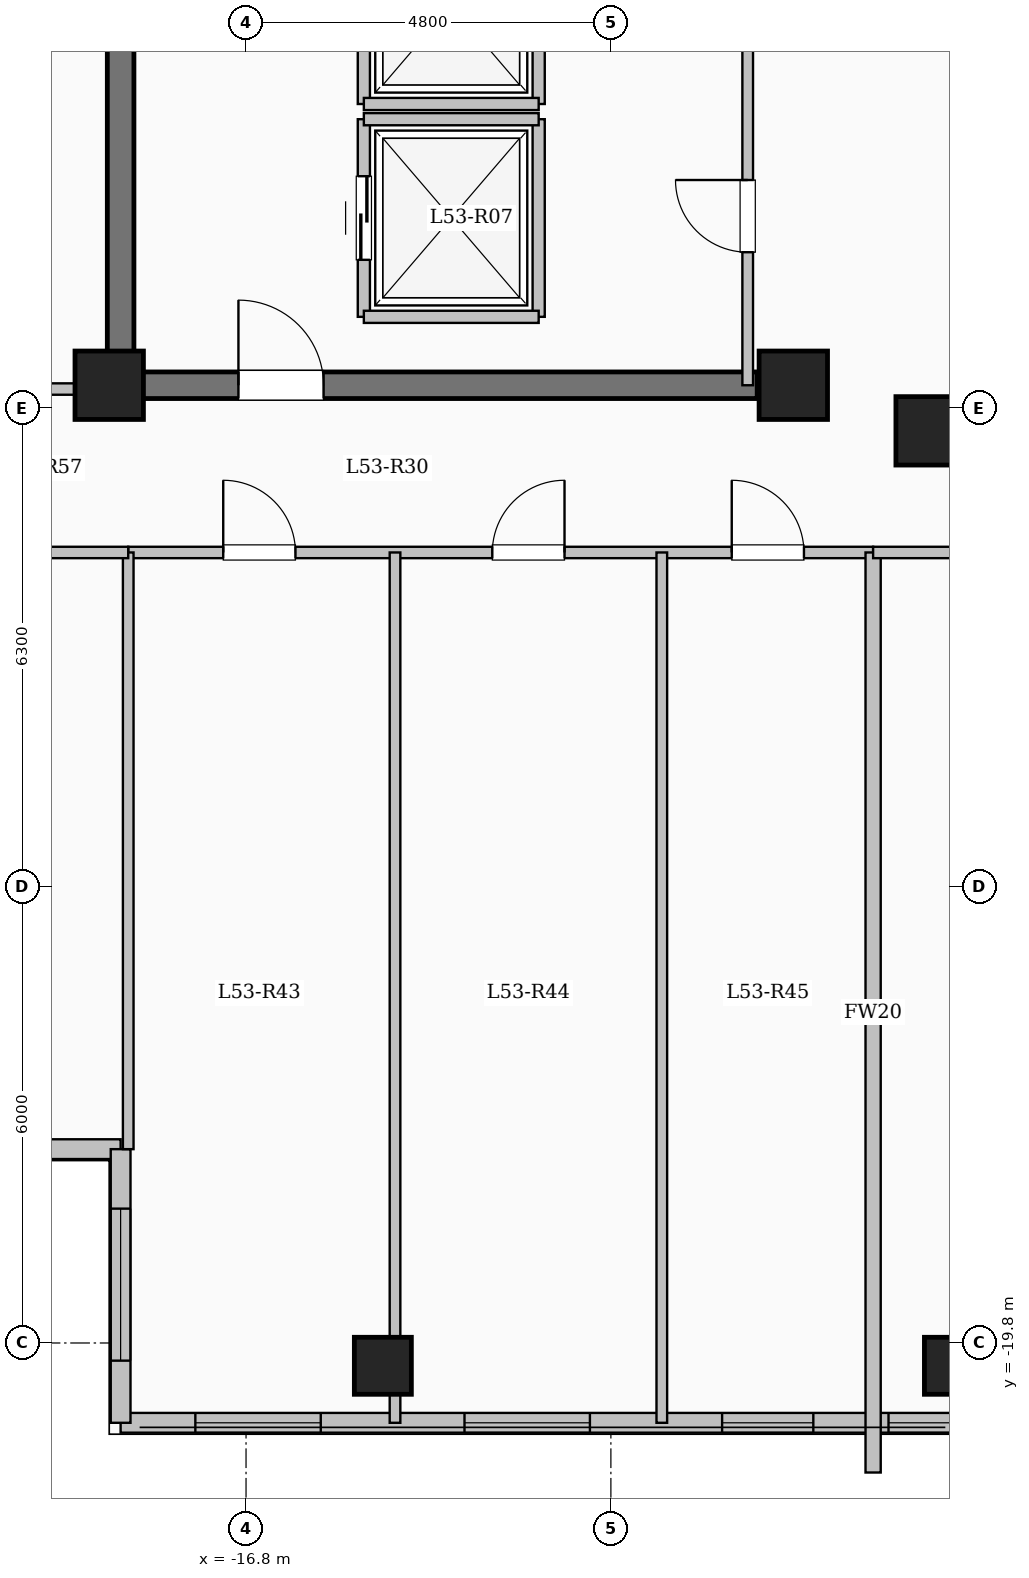
"""IFC4 building model, lengths in metres.
Left out: names, types, materials, properties, quantities, classifications, styles, units other than length and angle.
Written with IfcOpenShell. Run it as: python <this file> out.ifc"""

import sys

from ifc_helpers import new_model, si_unit, direction, frame, frame_2d, origin, origin_2d, place, context, subcontext, project, spatial, rectangle, extrude, element, fill, save


model = new_model("IFC4")
c1 = context("Model", 3, precision=1e-05, world=origin(), true_north=direction((0.0, 1.0)))
c2 = subcontext(c1, "Body", "Model", "MODEL_VIEW")
j1 = project(units=[si_unit("LENGTHUNIT", "METRE"), si_unit("PLANEANGLEUNIT", "RADIAN")], contexts=[c1])
p1 = place(None, origin())
s1 = spatial("IfcSite", under=j1, at=p1, CompositionType="ELEMENT")
p2 = place(p1, origin())
s2 = spatial("IfcBuilding", under=s1, at=p2, CompositionType="ELEMENT")
p3 = place(p2, frame((0.0, 0.0, 196.95)))
s3 = spatial("IfcBuildingStorey", under=s2, at=p3, CompositionType="ELEMENT", Elevation=196.95)
for number, where, z_axis, x_axis in (
    (1, (-7.8, -7.8, 0.0), (0.0, 0.0, 1.0), (1.0, 0.0, 0.0)),
    (2, (-9.6, -7.2, 0.0), (0.0, 0.0, 1.0), (1.0, 0.0, 0.0)),
    (3, (-18.6, -7.2, 0.0), (0.0, 0.0, 1.0), (1.0, 0.0, 0.0)),
):
    element("IfcColumn", number, at=place(p3, frame(where, z_axis=z_axis, x_axis=x_axis)), inside=s3, PredefinedType="COLUMN", context=c2, shape_type="SweptSolid", body=[
        extrude(rectangle(XDim=0.9, YDim=0.9, at=origin_2d()), origin(), (0.0, 0.0, 1.0), 3.35),
    ])
for number, where, z_axis, x_axis in (
    (4, (-15.0, -20.1, 0.0), (0.0, 0.0, 1.0), (1.0, 0.0, 0.0)),
    (5, (-7.5, -20.1, 0.0), (0.0, 0.0, 1.0), (1.0, 0.0, 0.0)),
):
    element("IfcColumn", number, at=place(p3, frame(where, z_axis=z_axis, x_axis=x_axis)), inside=s3, PredefinedType="COLUMN", context=c2, shape_type="SweptSolid", body=[
        extrude(rectangle(XDim=0.75, YDim=0.75, at=origin_2d()), origin(), (0.0, 0.0, 1.0), 3.35),
    ])
p4 = place(p3, frame((-18.45, -17.25, 0.0), z_axis=(0.0, 0.0, 1.0), x_axis=(-1.0, 0.0, 0.0)))
e6 = element("IfcWall", 6, at=p4, inside=s3, PredefinedType="SOLIDWALL", context=c2, shape_type="SweptSolid", body=[
    extrude(rectangle(XDim=5.1, YDim=0.26, at=frame_2d((2.55, 0.0))), origin(), (0.0, 0.0, 1.0), 3.1),
])
p5 = place(p4, frame((1.425, 0.0, 0.9)))
e7 = element("IfcOpeningElement", 7, at=p5, cuts=e6, PredefinedType="OPENING", context=c2, shape_type="SweptSolid", body=[
    extrude(rectangle(XDim=2.2, YDim=1.75, at=frame_2d((1.1, 0.875))), frame((0.0, 0.14, 0.0), z_axis=(0.0, -1.0, 0.0), x_axis=(1.0, 0.0, 0.0)), (0.0, 0.0, 1.0), 0.28),
])
p6 = place(p3, frame((-7.35, -20.85, 0.0), z_axis=(0.0, 0.0, 1.0), x_axis=(-1.0, 0.0, 0.0)))
e8 = element("IfcWall", 8, at=p6, inside=s3, PredefinedType="SOLIDWALL", context=c2, shape_type="SweptSolid", body=[
    extrude(rectangle(XDim=11.1, YDim=0.26, at=frame_2d((5.55, 0.0))), origin(), (0.0, 0.0, 1.0), 3.1),
])
p7 = place(p6, frame((0.147, 0.0, 0.95)))
e9 = element("IfcOpeningElement", 9, at=p7, cuts=e8, PredefinedType="OPENING", context=c2, shape_type="SweptSolid", body=[
    extrude(rectangle(XDim=0.85, YDim=1.5, at=frame_2d((0.425, 0.75))), frame((0.0, 0.14, 0.0), z_axis=(0.0, -1.0, 0.0), x_axis=(1.0, 0.0, 0.0)), (0.0, 0.0, 1.0), 0.28),
])
p8 = place(p6, frame((1.987, 0.0, 0.95)))
e10 = element("IfcOpeningElement", 10, at=p8, cuts=e8, PredefinedType="OPENING", context=c2, shape_type="SweptSolid", body=[
    extrude(rectangle(XDim=1.2, YDim=1.5, at=frame_2d((0.6, 0.75))), frame((0.0, 0.14, 0.0), z_axis=(0.0, -1.0, 0.0), x_axis=(1.0, 0.0, 0.0)), (0.0, 0.0, 1.0), 0.28),
])
p9 = place(p6, frame((4.926, 0.0, 0.9)))
e11 = element("IfcOpeningElement", 11, at=p9, cuts=e8, PredefinedType="OPENING", context=c2, shape_type="SweptSolid", body=[
    extrude(rectangle(XDim=1.65, YDim=1.6, at=frame_2d((0.825, 0.8))), frame((0.0, 0.14, 0.0), z_axis=(0.0, -1.0, 0.0), x_axis=(1.0, 0.0, 0.0)), (0.0, 0.0, 1.0), 0.28),
])
p10 = place(p6, frame((8.467, 0.0, 0.9)))
e12 = element("IfcOpeningElement", 12, at=p10, cuts=e8, PredefinedType="OPENING", context=c2, shape_type="SweptSolid", body=[
    extrude(rectangle(XDim=1.65, YDim=1.6, at=frame_2d((0.825, 0.8))), frame((0.0, 0.14, 0.0), z_axis=(0.0, -1.0, 0.0), x_axis=(1.0, 0.0, 0.0)), (0.0, 0.0, 1.0), 0.28),
])
p11 = place(p3, frame((-18.45, -20.85, 0.0), z_axis=(0.0, 0.0, 1.0), x_axis=(0.0, 1.0, 0.0)))
e13 = element("IfcWall", 13, at=p11, inside=s3, PredefinedType="SOLIDWALL", context=c2, shape_type="SweptSolid", body=[
    extrude(rectangle(XDim=3.6, YDim=0.26, at=frame_2d((1.8, 0.0))), origin(), (0.0, 0.0, 1.0), 3.1),
])
p12 = place(p11, frame((0.817, 0.0, 0.9)))
e14 = element("IfcOpeningElement", 14, at=p12, cuts=e13, PredefinedType="OPENING", context=c2, shape_type="SweptSolid", body=[
    extrude(rectangle(XDim=2.0, YDim=1.7, at=frame_2d((1.0, 0.85))), frame((0.0, 0.14, 0.0), z_axis=(0.0, -1.0, 0.0), x_axis=(1.0, 0.0, 0.0)), (0.0, 0.0, 1.0), 0.28),
])
p13 = place(p3, frame((-15.25, -6.3, 0.0), z_axis=(0.0, 0.0, 1.0), x_axis=(0.0, 1.0, 0.0)))
e15 = element("IfcWall", 15, at=p13, inside=s3, PredefinedType="SOLIDWALL", context=c2, shape_type="SweptSolid", body=[
    extrude(rectangle(XDim=2.6, YDim=0.16, at=frame_2d((1.3, 0.0))), origin(), (0.0, 0.0, 1.0), 3.1),
])
p14 = place(p13, frame((0.75, 0.0, 0.0)))
e16 = element("IfcOpeningElement", 16, at=p14, cuts=e15, PredefinedType="OPENING", context=c2, shape_type="SweptSolid", body=[
    extrude(rectangle(XDim=1.1, YDim=2.15, at=frame_2d((0.55, 1.075))), frame((0.0, 0.09, 0.0), z_axis=(0.0, -1.0, 0.0), x_axis=(1.0, 0.0, 0.0)), (0.0, 0.0, 1.0), 0.18),
])
p15 = place(p3, frame((-12.95, -6.3, 0.0), z_axis=(0.0, 0.0, 1.0), x_axis=(0.0, 1.0, 0.0)))
e17 = element("IfcWall", 17, at=p15, inside=s3, PredefinedType="SOLIDWALL", context=c2, shape_type="SweptSolid", body=[
    extrude(rectangle(XDim=2.6, YDim=0.16, at=frame_2d((1.3, 0.0))), origin(), (0.0, 0.0, 1.0), 3.1),
])
for number, where, z_axis, x_axis in (
    (18, (-15.25, -6.3, 0.0), (0.0, 0.0, 1.0), (1.0, 0.0, 0.0)),
    (19, (-15.25, -3.7, 0.0), (0.0, 0.0, 1.0), (1.0, 0.0, 0.0)),
):
    element("IfcWall", number, at=place(p3, frame(where, z_axis=z_axis, x_axis=x_axis)), inside=s3, PredefinedType="SOLIDWALL", context=c2, shape_type="SweptSolid", body=[
        extrude(rectangle(XDim=2.3, YDim=0.16, at=frame_2d((1.15, 0.0))), origin(), (0.0, 0.0, 1.0), 3.1),
    ])
p16 = place(p3, frame((-15.25, -3.5, 0.0), z_axis=(0.0, 0.0, 1.0), x_axis=(0.0, 1.0, 0.0)))
e20 = element("IfcWall", 20, at=p16, inside=s3, PredefinedType="SOLIDWALL", context=c2, shape_type="SweptSolid", body=[
    extrude(rectangle(XDim=2.6, YDim=0.16, at=frame_2d((1.3, 0.0))), origin(), (0.0, 0.0, 1.0), 3.1),
])
p17 = place(p16, frame((0.75, 0.0, 0.0)))
e21 = element("IfcOpeningElement", 21, at=p17, cuts=e20, PredefinedType="OPENING", context=c2, shape_type="SweptSolid", body=[
    extrude(rectangle(XDim=1.1, YDim=2.15, at=frame_2d((0.55, 1.075))), frame((0.0, 0.09, 0.0), z_axis=(0.0, -1.0, 0.0), x_axis=(1.0, 0.0, 0.0)), (0.0, 0.0, 1.0), 0.18),
])
p18 = place(p3, frame((-12.95, -3.5, 0.0), z_axis=(0.0, 0.0, 1.0), x_axis=(0.0, 1.0, 0.0)))
e22 = element("IfcWall", 22, at=p18, inside=s3, PredefinedType="SOLIDWALL", context=c2, shape_type="SweptSolid", body=[
    extrude(rectangle(XDim=2.6, YDim=0.16, at=frame_2d((1.3, 0.0))), origin(), (0.0, 0.0, 1.0), 3.1),
])
p19 = place(p3, frame((-15.25, -3.5, 0.0), z_axis=(0.0, 0.0, 1.0), x_axis=(1.0, 0.0, 0.0)))
e23 = element("IfcWall", 23, at=p19, inside=s3, PredefinedType="SOLIDWALL", context=c2, shape_type="SweptSolid", body=[
    extrude(rectangle(XDim=2.3, YDim=0.16, at=frame_2d((1.15, 0.0))), origin(), (0.0, 0.0, 1.0), 3.1),
])
p20 = place(p3, frame((-18.45, -7.375, 0.0), z_axis=(0.0, 0.0, 1.0), x_axis=(0.0, 1.0, 0.0)))
e24 = element("IfcWall", 24, at=p20, inside=s3, PredefinedType="SHEAR", context=c2, shape_type="SweptSolid", body=[
    extrude(rectangle(XDim=14.05, YDim=0.35, at=frame_2d((7.025, 0.0))), origin(), (0.0, 0.0, 1.0), 3.35),
])
p21 = place(p3, frame((-18.625, -7.2, 0.0), z_axis=(0.0, 0.0, 1.0), x_axis=(1.0, 0.0, 0.0)))
e25 = element("IfcWall", 25, at=p21, inside=s3, PredefinedType="SHEAR", context=c2, shape_type="SweptSolid", body=[
    extrude(rectangle(XDim=8.55, YDim=0.35, at=frame_2d((4.275, 0.0))), origin(), (0.0, 0.0, 1.0), 3.35),
])
p22 = place(p21, frame((1.725, 0.0, 0.0)))
e26 = element("IfcOpeningElement", 26, at=p22, cuts=e25, PredefinedType="OPENING", context=c2, shape_type="SweptSolid", body=[
    extrude(rectangle(XDim=1.12, YDim=2.15, at=frame_2d((0.56, 1.075))), frame((0.0, 0.185, 0.0), z_axis=(0.0, -1.0, 0.0), x_axis=(1.0, 0.0, 0.0)), (0.0, 0.0, 1.0), 0.37),
])
p23 = place(p3, frame((-10.2, -7.2, 0.0), z_axis=(0.0, 0.0, 1.0), x_axis=(0.0, 1.0, 0.0)))
e27 = element("IfcWall", 27, at=p23, inside=s3, PredefinedType="PARTITIONING", context=c2, shape_type="SweptSolid", body=[
    extrude(rectangle(XDim=9.12, YDim=0.14, at=frame_2d((4.56, 0.0))), origin(), (0.0, 0.0, 1.0), 3.1),
])
p24 = place(p23, frame((1.75, 0.0, 0.0)))
e28 = element("IfcOpeningElement", 28, at=p24, cuts=e27, PredefinedType="OPENING", context=c2, shape_type="SweptSolid", body=[
    extrude(rectangle(XDim=0.95, YDim=2.12, at=frame_2d((0.475, 1.06))), frame((0.0, 0.08, 0.0), z_axis=(0.0, -1.0, 0.0), x_axis=(1.0, 0.0, 0.0)), (0.0, 0.0, 1.0), 0.16),
])
p25 = place(p23, frame((7.9, 0.0, 0.0)))
e29 = element("IfcOpeningElement", 29, at=p25, cuts=e27, PredefinedType="OPENING", context=c2, shape_type="SweptSolid", body=[
    extrude(rectangle(XDim=0.95, YDim=2.12, at=frame_2d((0.475, 1.06))), frame((0.0, 0.08, 0.0), z_axis=(0.0, -1.0, 0.0), x_axis=(1.0, 0.0, 0.0)), (0.0, 0.0, 1.0), 0.16),
])
p26 = place(p3, frame((-18.35, -9.4, 0.0), z_axis=(0.0, 0.0, 1.0), x_axis=(1.0, 0.0, 0.0)))
e30 = element("IfcWall", 30, at=p26, inside=s3, PredefinedType="PARTITIONING", context=c2, shape_type="SweptSolid", body=[
    extrude(rectangle(XDim=9.8, YDim=0.15, at=frame_2d((4.9, 0.0))), origin(), (0.0, 0.0, 1.0), 3.1),
])
p27 = place(p26, frame((1.25, 0.0, 0.0)))
e31 = element("IfcOpeningElement", 31, at=p27, cuts=e30, PredefinedType="OPENING", context=c2, shape_type="SweptSolid", body=[
    extrude(rectangle(XDim=0.95, YDim=2.15, at=frame_2d((0.475, 1.075))), frame((0.0, 0.085, 0.0), z_axis=(0.0, -1.0, 0.0), x_axis=(1.0, 0.0, 0.0)), (0.0, 0.0, 1.0), 0.17),
])
p28 = place(p26, frame((4.79, 0.0, 0.0)))
e32 = element("IfcOpeningElement", 32, at=p28, cuts=e30, PredefinedType="OPENING", context=c2, shape_type="SweptSolid", body=[
    extrude(rectangle(XDim=0.95, YDim=2.15, at=frame_2d((0.475, 1.075))), frame((0.0, 0.085, 0.0), z_axis=(0.0, -1.0, 0.0), x_axis=(1.0, 0.0, 0.0)), (0.0, 0.0, 1.0), 0.17),
])
p29 = place(p26, frame((7.94, 0.0, 0.0)))
e33 = element("IfcOpeningElement", 33, at=p29, cuts=e30, PredefinedType="OPENING", context=c2, shape_type="SweptSolid", body=[
    extrude(rectangle(XDim=0.95, YDim=2.15, at=frame_2d((0.475, 1.075))), frame((0.0, 0.085, 0.0), z_axis=(0.0, -1.0, 0.0), x_axis=(1.0, 0.0, 0.0)), (0.0, 0.0, 1.0), 0.17),
])
p30 = place(p3, frame((-14.84, -20.85, 0.0), z_axis=(0.0, 0.0, 1.0), x_axis=(0.0, 1.0, 0.0)))
e34 = element("IfcWall", 34, at=p30, inside=s3, PredefinedType="PARTITIONING", context=c2, shape_type="SweptSolid", body=[
    extrude(rectangle(XDim=11.45, YDim=0.14, at=frame_2d((5.725, 0.0))), origin(), (0.0, 0.0, 1.0), 2.585),
])
p31 = place(p3, frame((-11.33, -20.85, 0.0), z_axis=(0.0, 0.0, 1.0), x_axis=(0.0, 1.0, 0.0)))
e35 = element("IfcWall", 35, at=p31, inside=s3, PredefinedType="PARTITIONING", context=c2, shape_type="SweptSolid", body=[
    extrude(rectangle(XDim=11.45, YDim=0.14, at=frame_2d((5.725, 0.0))), origin(), (0.0, 0.0, 1.0), 3.1),
])
p32 = place(p3, frame((-8.55, -21.504, 0.0), z_axis=(0.0, 0.0, 1.0), x_axis=(0.0, 1.0, 0.0)))
e36 = element("IfcWall", 36, at=p32, inside=s3, PredefinedType="SOLIDWALL", context=c2, shape_type="SweptSolid", body=[
    extrude(rectangle(XDim=12.104, YDim=0.2, at=frame_2d((6.052, 0.0))), origin(), (0.0, 0.0, 1.0), 3.1),
])
p33 = place(p3, frame((-8.55, -9.4, 0.0), z_axis=(0.0, 0.0, 1.0), x_axis=(1.0, 0.0, 0.0)))
e37 = element("IfcWall", 37, at=p33, inside=s3, PredefinedType="PARTITIONING", context=c2, shape_type="SweptSolid", body=[
    extrude(rectangle(XDim=17.1, YDim=0.15, at=frame_2d((8.55, 0.0))), origin(), (0.0, 0.0, 1.0), 3.1),
])
p34 = place(p33, frame((1.9, 0.0, 0.0)))
e38 = element("IfcOpeningElement", 38, at=p34, cuts=e37, PredefinedType="OPENING", context=c2, shape_type="SweptSolid", body=[
    extrude(rectangle(XDim=0.95, YDim=2.15, at=frame_2d((0.475, 1.075))), frame((0.0, 0.085, 0.0), z_axis=(0.0, -1.0, 0.0), x_axis=(1.0, 0.0, 0.0)), (0.0, 0.0, 1.0), 0.17),
])
p35 = place(p33, frame((10.5, 0.0, 0.0)))
e39 = element("IfcOpeningElement", 39, at=p35, cuts=e37, PredefinedType="OPENING", context=c2, shape_type="SweptSolid", body=[
    extrude(rectangle(XDim=0.95, YDim=2.15, at=frame_2d((0.475, 1.075))), frame((0.0, 0.085, 0.0), z_axis=(0.0, -1.0, 0.0), x_axis=(1.0, 0.0, 0.0)), (0.0, 0.0, 1.0), 0.17),
])
p36 = place(p3, frame((-23.58, -7.25, 0.0), z_axis=(0.0, 0.0, 1.0), x_axis=(1.0, 0.0, 0.0)))
e40 = element("IfcWall", 40, at=p36, inside=s3, PredefinedType="PARTITIONING", context=c2, shape_type="SweptSolid", body=[
    extrude(rectangle(XDim=5.13, YDim=0.15, at=frame_2d((2.565, 0.0))), origin(), (0.0, 0.0, 1.0), 3.1),
])
p37 = place(p36, frame((2.08, 0.0, 0.0)))
e41 = element("IfcOpeningElement", 41, at=p37, cuts=e40, PredefinedType="OPENING", context=c2, shape_type="SweptSolid", body=[
    extrude(rectangle(XDim=1.08, YDim=2.15, at=frame_2d((0.54, 1.075))), frame((0.0, 0.085, 0.0), z_axis=(0.0, -1.0, 0.0), x_axis=(1.0, 0.0, 0.0)), (0.0, 0.0, 1.0), 0.17),
])
p38 = place(p3, frame((-18.35, -17.25, 0.0), z_axis=(0.0, 0.0, 1.0), x_axis=(0.0, 1.0, 0.0)))
e42 = element("IfcWall", 42, at=p38, inside=s3, PredefinedType="PARTITIONING", context=c2, shape_type="SweptSolid", body=[
    extrude(rectangle(XDim=7.85, YDim=0.14, at=frame_2d((3.925, 0.0))), origin(), (0.0, 0.0, 1.0), 3.1),
])
p39 = place(p3, frame((-23.58, -9.4, 0.0), z_axis=(0.0, 0.0, 1.0), x_axis=(1.0, 0.0, 0.0)))
e43 = element("IfcWall", 43, at=p39, inside=s3, PredefinedType="PARTITIONING", context=c2, shape_type="SweptSolid", body=[
    extrude(rectangle(XDim=5.23, YDim=0.15, at=frame_2d((2.615, 0.0))), origin(), (0.0, 0.0, 1.0), 3.1),
])
p40 = place(p39, frame((2.14, 0.0, 0.0)))
e44 = element("IfcOpeningElement", 44, at=p40, cuts=e43, PredefinedType="OPENING", context=c2, shape_type="SweptSolid", body=[
    extrude(rectangle(XDim=0.95, YDim=2.15, at=frame_2d((0.475, 1.075))), frame((0.0, 0.085, 0.0), z_axis=(0.0, -1.0, 0.0), x_axis=(1.0, 0.0, 0.0)), (0.0, 0.0, 1.0), 0.17),
])
p41 = place(p7, origin())
e45 = element("IfcWindow", 45, at=p41, inside=s3, PartitioningType="SINGLE_PANEL", PredefinedType="WINDOW", context=c2, shape_type="SweptSolid", body=[
    extrude(rectangle(XDim=0.85, YDim=1.5, at=frame_2d((0.425, 0.75))), frame((0.0, 0.03, 0.0), z_axis=(0.0, -1.0, 0.0), x_axis=(1.0, 0.0, 0.0)), (0.0, 0.0, 1.0), 0.06),
])
fill(e9, e45)
p42 = place(p8, origin())
e46 = element("IfcWindow", 46, at=p42, inside=s3, PartitioningType="SINGLE_PANEL", PredefinedType="WINDOW", context=c2, shape_type="SweptSolid", body=[
    extrude(rectangle(XDim=1.2, YDim=1.5, at=frame_2d((0.6, 0.75))), frame((0.0, 0.03, 0.0), z_axis=(0.0, -1.0, 0.0), x_axis=(1.0, 0.0, 0.0)), (0.0, 0.0, 1.0), 0.06),
])
fill(e10, e46)
p43 = place(p9, origin())
e47 = element("IfcWindow", 47, at=p43, inside=s3, PartitioningType="SINGLE_PANEL", PredefinedType="WINDOW", context=c2, shape_type="SweptSolid", body=[
    extrude(rectangle(XDim=1.65, YDim=1.6, at=frame_2d((0.825, 0.8))), frame((0.0, 0.03, 0.0), z_axis=(0.0, -1.0, 0.0), x_axis=(1.0, 0.0, 0.0)), (0.0, 0.0, 1.0), 0.06),
])
fill(e11, e47)
p44 = place(p10, origin())
e48 = element("IfcWindow", 48, at=p44, inside=s3, PartitioningType="SINGLE_PANEL", PredefinedType="WINDOW", context=c2, shape_type="SweptSolid", body=[
    extrude(rectangle(XDim=1.65, YDim=1.6, at=frame_2d((0.825, 0.8))), frame((0.0, 0.03, 0.0), z_axis=(0.0, -1.0, 0.0), x_axis=(1.0, 0.0, 0.0)), (0.0, 0.0, 1.0), 0.06),
])
fill(e12, e48)
p45 = place(p12, origin())
e49 = element("IfcWindow", 49, at=p45, inside=s3, PartitioningType="SINGLE_PANEL", PredefinedType="WINDOW", context=c2, shape_type="SweptSolid", body=[
    extrude(rectangle(XDim=2.0, YDim=1.7, at=frame_2d((1.0, 0.85))), frame((0.0, 0.03, 0.0), z_axis=(0.0, -1.0, 0.0), x_axis=(1.0, 0.0, 0.0)), (0.0, 0.0, 1.0), 0.06),
])
fill(e14, e49)
p46 = place(p14, origin())
e50 = element("IfcDoor", 50, at=p46, inside=s3, OperationType="SLIDING_TO_LEFT", PredefinedType="DOOR", context=c2, shape_type="SweptSolid", body=[
    extrude(rectangle(XDim=1.1, YDim=2.15, at=frame_2d((0.55, 1.075))), frame((0.0, 0.025, 0.0), z_axis=(0.0, -1.0, 0.0), x_axis=(1.0, 0.0, 0.0)), (0.0, 0.0, 1.0), 0.05),
])
fill(e16, e50)
p47 = place(p22, origin())
e51 = element("IfcDoor", 51, at=p47, inside=s3, OperationType="SINGLE_SWING_LEFT", PredefinedType="DOOR", context=c2, shape_type="SweptSolid", body=[
    extrude(rectangle(XDim=1.12, YDim=2.15, at=frame_2d((0.56, 1.075))), frame((0.0, 0.025, 0.0), z_axis=(0.0, -1.0, 0.0), x_axis=(1.0, 0.0, 0.0)), (0.0, 0.0, 1.0), 0.05),
])
fill(e26, e51)
p48 = place(p24, origin())
e52 = element("IfcDoor", 52, at=p48, inside=s3, OperationType="SINGLE_SWING_RIGHT", PredefinedType="DOOR", context=c2, shape_type="SweptSolid", body=[
    extrude(rectangle(XDim=0.95, YDim=2.12, at=frame_2d((0.475, 1.06))), frame((0.0, 0.025, 0.0), z_axis=(0.0, -1.0, 0.0), x_axis=(1.0, 0.0, 0.0)), (0.0, 0.0, 1.0), 0.05),
])
fill(e28, e52)
p49 = place(p27, origin())
e53 = element("IfcDoor", 53, at=p49, inside=s3, OperationType="SINGLE_SWING_LEFT", PredefinedType="DOOR", context=c2, shape_type="SweptSolid", body=[
    extrude(rectangle(XDim=0.95, YDim=2.15, at=frame_2d((0.475, 1.075))), frame((0.0, 0.025, 0.0), z_axis=(0.0, -1.0, 0.0), x_axis=(1.0, 0.0, 0.0)), (0.0, 0.0, 1.0), 0.05),
])
fill(e31, e53)
p50 = place(p28, origin())
e54 = element("IfcDoor", 54, at=p50, inside=s3, OperationType="SINGLE_SWING_RIGHT", PredefinedType="DOOR", context=c2, shape_type="SweptSolid", body=[
    extrude(rectangle(XDim=0.95, YDim=2.15, at=frame_2d((0.475, 1.075))), frame((0.0, 0.025, 0.0), z_axis=(0.0, -1.0, 0.0), x_axis=(1.0, 0.0, 0.0)), (0.0, 0.0, 1.0), 0.05),
])
fill(e32, e54)
p51 = place(p29, origin())
e55 = element("IfcDoor", 55, at=p51, inside=s3, OperationType="SINGLE_SWING_LEFT", PredefinedType="DOOR", context=c2, shape_type="SweptSolid", body=[
    extrude(rectangle(XDim=0.95, YDim=2.15, at=frame_2d((0.475, 1.075))), frame((0.0, 0.025, 0.0), z_axis=(0.0, -1.0, 0.0), x_axis=(1.0, 0.0, 0.0)), (0.0, 0.0, 1.0), 0.05),
])
fill(e33, e55)
save(model, sys.argv[1])
